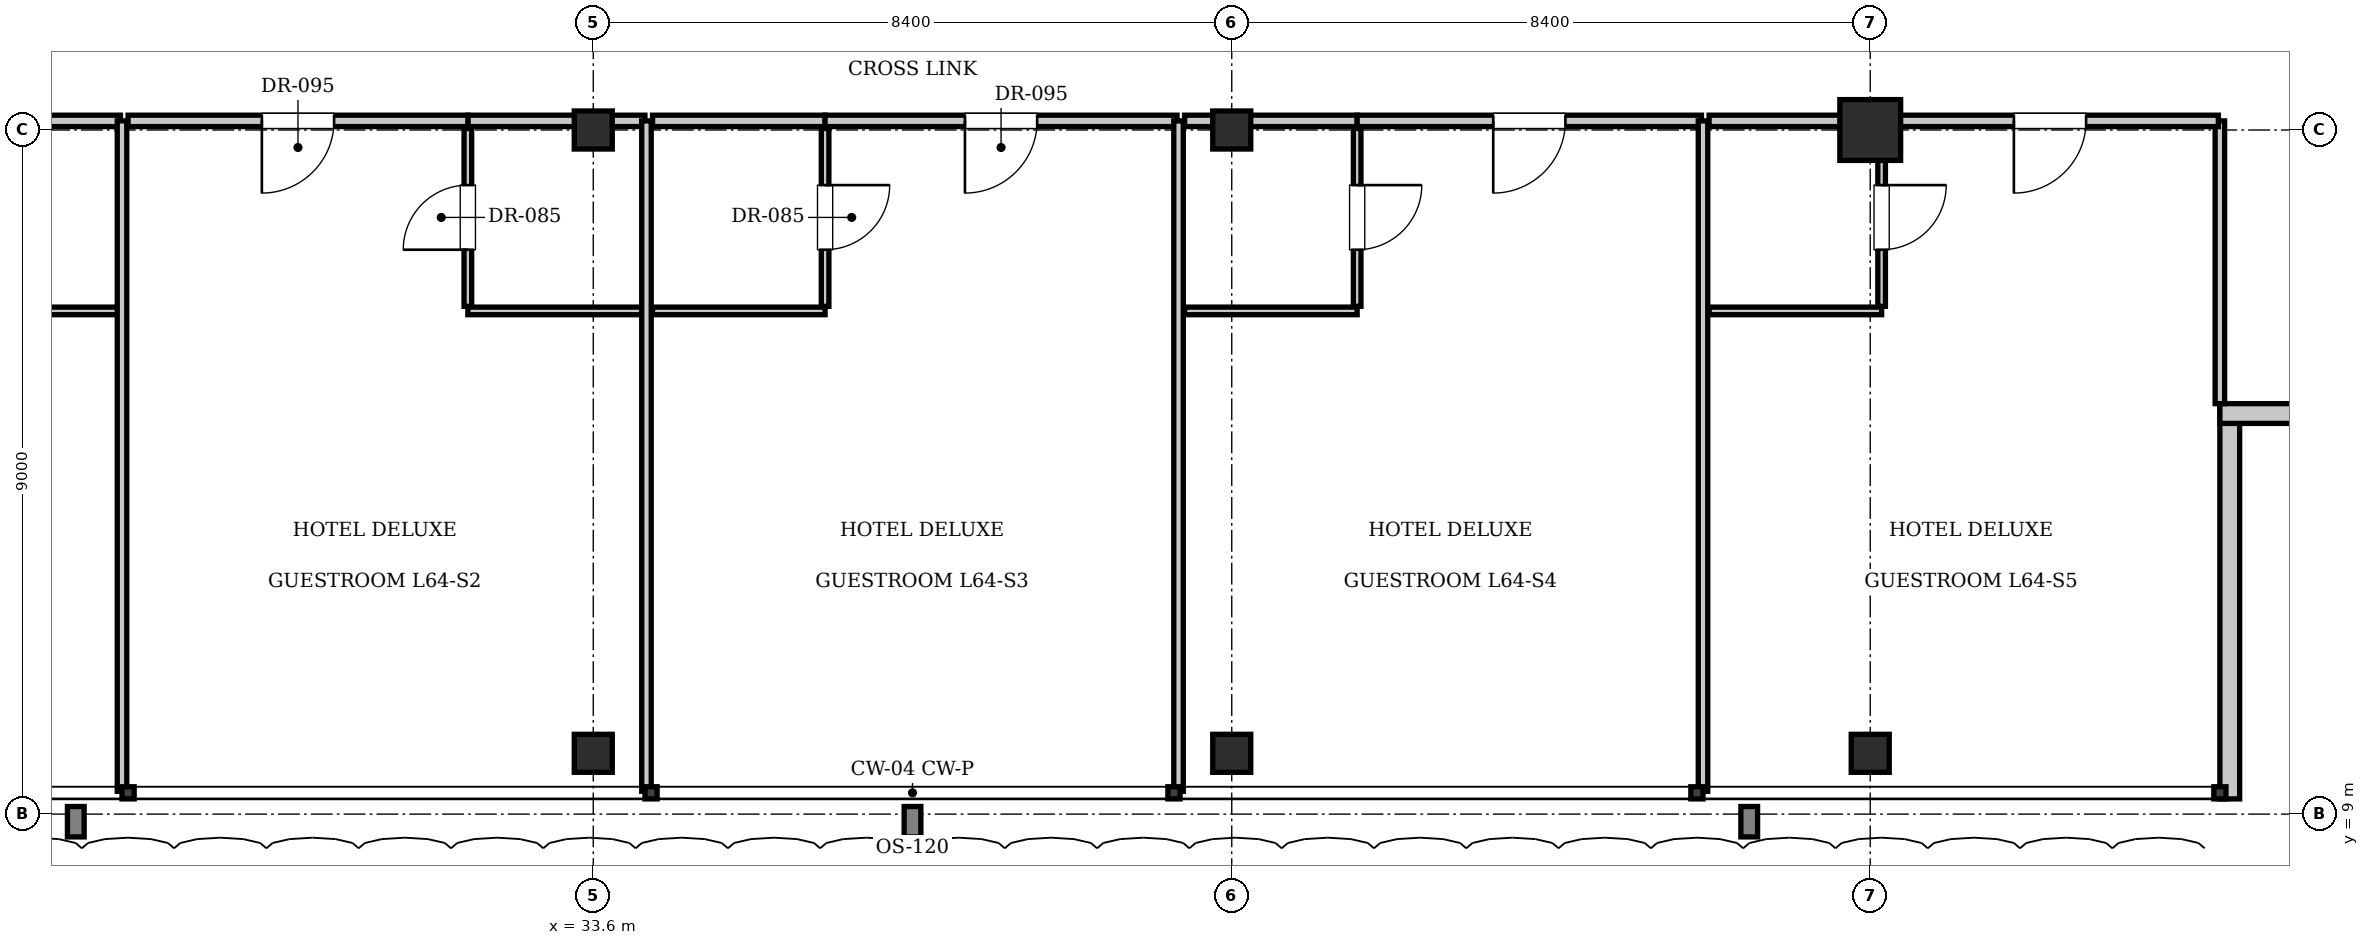
"""IFC4 building model, lengths in metres.
Left out: names, types, materials, properties, quantities, classifications, styles, units other than length and angle.
Written with IfcOpenShell. Run it as: python <this file> out.ifc"""

import sys

from ifc_helpers import new_model, si_unit, direction, frame, frame_2d, origin, origin_2d, place, context, subcontext, project, spatial, rectangle, i_section, extrude, element, fill, save


model = new_model("IFC4")
c1 = context("Model", 3, precision=1e-05, world=origin(), true_north=direction((0.0, 1.0)))
c2 = subcontext(c1, "Body", "Model", "MODEL_VIEW")
j1 = project(units=[si_unit("LENGTHUNIT", "METRE"), si_unit("PLANEANGLEUNIT", "RADIAN")], contexts=[c1])
p1 = place(None, origin())
s1 = spatial("IfcSite", under=j1, at=p1, CompositionType="ELEMENT")
p2 = place(p1, origin())
s2 = spatial("IfcBuilding", under=s1, at=p2, CompositionType="ELEMENT")
p3 = place(p2, frame((0.0, 0.0, 262.5)))
s3 = spatial("IfcBuildingStorey", under=s2, at=p3, CompositionType="ELEMENT", Elevation=262.5)
p4 = place(p3, frame((50.4, 18.0, 0.0), z_axis=(0.0, 0.0, 1.0), x_axis=(1.0, 0.0, 0.0)))
e1 = element("IfcColumn", 1, at=p4, inside=s3, PredefinedType="COLUMN", context=c2, shape_type="SweptSolid", body=[
    extrude(rectangle(XDim=0.8, YDim=0.8, at=origin_2d()), origin(), (0.0, 0.0, 1.0), 3.85),
])
for number, where, z_axis, x_axis in (
    (2, (33.6, 18.0, 0.0), (0.0, 0.0, 1.0), (1.0, 0.0, 0.0)),
    (3, (42.0, 18.0, 0.0), (0.0, 0.0, 1.0), (1.0, 0.0, 0.0)),
    (4, (33.6, 9.8, 0.0), (0.0, 0.0, 1.0), (1.0, 0.0, 0.0)),
    (5, (42.0, 9.8, 0.0), (0.0, 0.0, 1.0), (1.0, 0.0, 0.0)),
    (6, (50.4, 9.8, 0.0), (0.0, 0.0, 1.0), (1.0, 0.0, 0.0)),
):
    element("IfcColumn", number, at=place(p3, frame(where, z_axis=z_axis, x_axis=x_axis)), inside=s3, PredefinedType="COLUMN", context=c2, shape_type="SweptSolid", body=[
        extrude(i_section(OverallWidth=0.5, OverallDepth=0.5, WebThickness=0.022, FlangeThickness=0.032, at=origin_2d()), origin(), (0.0, 0.0, 1.0), 3.85),
    ])
p5 = place(p3, frame((55.13, 14.4, 0.0), z_axis=(0.0, 0.0, 1.0), x_axis=(0.0, -1.0, 0.0)))
e7 = element("IfcWall", 7, at=p5, inside=s3, PredefinedType="SOLIDWALL", context=c2, shape_type="SweptSolid", body=[
    extrude(rectangle(XDim=5.2, YDim=0.26, at=frame_2d((2.6, 0.0))), origin(), (0.0, 0.0, 1.0), 3.61),
])
p6 = place(p3, frame((60.2, 14.27, 0.0), z_axis=(0.0, 0.0, 1.0), x_axis=(-1.0, 0.0, 0.0)))
e8 = element("IfcWall", 8, at=p6, inside=s3, PredefinedType="SOLIDWALL", context=c2, shape_type="SweptSolid", body=[
    extrude(rectangle(XDim=5.2, YDim=0.26, at=frame_2d((2.6, 0.0))), origin(), (0.0, 0.0, 1.0), 3.61),
])
p7 = place(p6, frame((1.6, 0.0, 0.9)))
e9 = element("IfcOpeningElement", 9, at=p7, cuts=e8, PredefinedType="OPENING", context=c2, shape_type="SweptSolid", body=[
    extrude(rectangle(XDim=2.0, YDim=2.2, at=frame_2d((1.0, 1.1))), frame((0.0, 0.14, 0.0), z_axis=(0.0, -1.0, 0.0), x_axis=(1.0, 0.0, 0.0)), (0.0, 0.0, 1.0), 0.28),
])
p8 = place(p3, frame((55.0, 14.4, 0.0), z_axis=(0.0, 0.0, 1.0), x_axis=(0.0, 1.0, 0.0)))
e10 = element("IfcWall", 10, at=p8, inside=s3, PredefinedType="PARTITIONING", context=c2, shape_type="SweptSolid", body=[
    extrude(rectangle(XDim=3.72, YDim=0.125, at=frame_2d((1.86, 0.0))), origin(), (0.0, 0.0, 1.0), 3.61),
])
p9 = place(p3, frame((25.05, 18.12, 0.0), z_axis=(0.0, 0.0, 1.0), x_axis=(1.0, 0.0, 0.0)))
e11 = element("IfcWall", 11, at=p9, inside=s3, PredefinedType="PARTITIONING", context=c2, shape_type="SweptSolid", body=[
    extrude(rectangle(XDim=2.33, YDim=0.15, at=frame_2d((1.165, 0.0))), origin(), (0.0, 0.0, 1.0), 3.077),
])
p10 = place(p3, frame((25.05, 15.62, 0.0), z_axis=(0.0, 0.0, 1.0), x_axis=(1.0, 0.0, 0.0)))
e12 = element("IfcWall", 12, at=p10, inside=s3, PredefinedType="PARTITIONING", context=c2, shape_type="SweptSolid", body=[
    extrude(rectangle(XDim=2.31, YDim=0.1, at=frame_2d((1.155, 0.0))), origin(), (0.0, 0.0, 1.0), 3.61),
])
p11 = place(p3, frame((27.4, 9.3, 0.0), z_axis=(0.0, 0.0, 1.0), x_axis=(0.0, 1.0, 0.0)))
e13 = element("IfcWall", 13, at=p11, inside=s3, PredefinedType="PARTITIONING", context=c2, shape_type="SweptSolid", body=[
    extrude(rectangle(XDim=8.82, YDim=0.125, at=frame_2d((4.41, 0.0))), origin(), (0.0, 0.0, 1.0), 3.61),
])
p12 = place(p3, frame((31.95, 18.12, 0.0), z_axis=(0.0, 0.0, 1.0), x_axis=(1.0, 0.0, 0.0)))
e14 = element("IfcWall", 14, at=p12, inside=s3, PredefinedType="PARTITIONING", context=c2, shape_type="SweptSolid", body=[
    extrude(rectangle(XDim=2.33, YDim=0.15, at=frame_2d((1.165, 0.0))), origin(), (0.0, 0.0, 1.0), 3.077),
])
p13 = place(p3, frame((31.95, 15.62, 0.0), z_axis=(0.0, 0.0, 1.0), x_axis=(1.0, 0.0, 0.0)))
e15 = element("IfcWall", 15, at=p13, inside=s3, PredefinedType="PARTITIONING", context=c2, shape_type="SweptSolid", body=[
    extrude(rectangle(XDim=2.31, YDim=0.1, at=frame_2d((1.155, 0.0))), origin(), (0.0, 0.0, 1.0), 3.61),
])
p14 = place(p3, frame((31.95, 15.68, 0.0), z_axis=(0.0, 0.0, 1.0), x_axis=(0.0, 1.0, 0.0)))
e16 = element("IfcWall", 16, at=p14, inside=s3, PredefinedType="PARTITIONING", context=c2, shape_type="SweptSolid", body=[
    extrude(rectangle(XDim=2.34, YDim=0.1, at=frame_2d((1.17, 0.0))), origin(), (0.0, 0.0, 1.0), 3.61),
])
p15 = place(p14, frame((0.745, 0.0, 0.0)))
e17 = element("IfcOpeningElement", 17, at=p15, cuts=e16, PredefinedType="OPENING", context=c2, shape_type="SweptSolid", body=[
    extrude(rectangle(XDim=0.85, YDim=2.1, at=frame_2d((0.425, 1.05))), frame((0.0, 0.06, 0.0), z_axis=(0.0, -1.0, 0.0), x_axis=(1.0, 0.0, 0.0)), (0.0, 0.0, 1.0), 0.12),
])
p16 = place(p3, frame((27.48, 18.12, 0.0), z_axis=(0.0, 0.0, 1.0), x_axis=(1.0, 0.0, 0.0)))
e18 = element("IfcWall", 18, at=p16, inside=s3, PredefinedType="PARTITIONING", context=c2, shape_type="SweptSolid", body=[
    extrude(rectangle(XDim=4.47, YDim=0.15, at=frame_2d((2.235, 0.0))), origin(), (0.0, 0.0, 1.0), 3.077),
])
p17 = place(p16, frame((1.76, 0.0, 0.0)))
e19 = element("IfcOpeningElement", 19, at=p17, cuts=e18, PredefinedType="OPENING", context=c2, shape_type="SweptSolid", body=[
    extrude(rectangle(XDim=0.95, YDim=2.15, at=frame_2d((0.475, 1.075))), frame((0.0, 0.085, 0.0), z_axis=(0.0, -1.0, 0.0), x_axis=(1.0, 0.0, 0.0)), (0.0, 0.0, 1.0), 0.17),
])
p18 = place(p3, frame((34.3, 9.3, 0.0), z_axis=(0.0, 0.0, 1.0), x_axis=(0.0, 1.0, 0.0)))
e20 = element("IfcWall", 20, at=p18, inside=s3, PredefinedType="PARTITIONING", context=c2, shape_type="SweptSolid", body=[
    extrude(rectangle(XDim=8.82, YDim=0.125, at=frame_2d((4.41, 0.0))), origin(), (0.0, 0.0, 1.0), 3.61),
])
p19 = place(p3, frame((34.38, 18.12, 0.0), z_axis=(0.0, 0.0, 1.0), x_axis=(1.0, 0.0, 0.0)))
e21 = element("IfcWall", 21, at=p19, inside=s3, PredefinedType="PARTITIONING", context=c2, shape_type="SweptSolid", body=[
    extrude(rectangle(XDim=2.27, YDim=0.15, at=frame_2d((1.135, 0.0))), origin(), (0.0, 0.0, 1.0), 3.077),
])
p20 = place(p3, frame((34.38, 15.62, 0.0), z_axis=(0.0, 0.0, 1.0), x_axis=(1.0, 0.0, 0.0)))
e22 = element("IfcWall", 22, at=p20, inside=s3, PredefinedType="PARTITIONING", context=c2, shape_type="SweptSolid", body=[
    extrude(rectangle(XDim=2.27, YDim=0.1, at=frame_2d((1.135, 0.0))), origin(), (0.0, 0.0, 1.0), 3.61),
])
p21 = place(p3, frame((36.65, 15.68, 0.0), z_axis=(0.0, 0.0, 1.0), x_axis=(0.0, 1.0, 0.0)))
e23 = element("IfcWall", 23, at=p21, inside=s3, PredefinedType="PARTITIONING", context=c2, shape_type="SweptSolid", body=[
    extrude(rectangle(XDim=2.34, YDim=0.1, at=frame_2d((1.17, 0.0))), origin(), (0.0, 0.0, 1.0), 3.61),
])
p22 = place(p21, frame((0.745, 0.0, 0.0)))
e24 = element("IfcOpeningElement", 24, at=p22, cuts=e23, PredefinedType="OPENING", context=c2, shape_type="SweptSolid", body=[
    extrude(rectangle(XDim=0.85, YDim=2.1, at=frame_2d((0.425, 1.05))), frame((0.0, 0.06, 0.0), z_axis=(0.0, -1.0, 0.0), x_axis=(1.0, 0.0, 0.0)), (0.0, 0.0, 1.0), 0.12),
])
p23 = place(p3, frame((36.65, 18.12, 0.0), z_axis=(0.0, 0.0, 1.0), x_axis=(1.0, 0.0, 0.0)))
e25 = element("IfcWall", 25, at=p23, inside=s3, PredefinedType="PARTITIONING", context=c2, shape_type="SweptSolid", body=[
    extrude(rectangle(XDim=4.63, YDim=0.15, at=frame_2d((2.315, 0.0))), origin(), (0.0, 0.0, 1.0), 3.077),
])
p24 = place(p23, frame((1.84, 0.0, 0.0)))
e26 = element("IfcOpeningElement", 26, at=p24, cuts=e25, PredefinedType="OPENING", context=c2, shape_type="SweptSolid", body=[
    extrude(rectangle(XDim=0.95, YDim=2.15, at=frame_2d((0.475, 1.075))), frame((0.0, 0.085, 0.0), z_axis=(0.0, -1.0, 0.0), x_axis=(1.0, 0.0, 0.0)), (0.0, 0.0, 1.0), 0.17),
])
p25 = place(p3, frame((41.3, 9.3, 0.0), z_axis=(0.0, 0.0, 1.0), x_axis=(0.0, 1.0, 0.0)))
e27 = element("IfcWall", 27, at=p25, inside=s3, PredefinedType="PARTITIONING", context=c2, shape_type="SweptSolid", body=[
    extrude(rectangle(XDim=8.82, YDim=0.125, at=frame_2d((4.41, 0.0))), origin(), (0.0, 0.0, 1.0), 3.61),
])
p26 = place(p3, frame((41.38, 18.12, 0.0), z_axis=(0.0, 0.0, 1.0), x_axis=(1.0, 0.0, 0.0)))
e28 = element("IfcWall", 28, at=p26, inside=s3, PredefinedType="PARTITIONING", context=c2, shape_type="SweptSolid", body=[
    extrude(rectangle(XDim=2.27, YDim=0.15, at=frame_2d((1.135, 0.0))), origin(), (0.0, 0.0, 1.0), 3.077),
])
p27 = place(p3, frame((41.38, 15.62, 0.0), z_axis=(0.0, 0.0, 1.0), x_axis=(1.0, 0.0, 0.0)))
e29 = element("IfcWall", 29, at=p27, inside=s3, PredefinedType="PARTITIONING", context=c2, shape_type="SweptSolid", body=[
    extrude(rectangle(XDim=2.27, YDim=0.1, at=frame_2d((1.135, 0.0))), origin(), (0.0, 0.0, 1.0), 3.61),
])
p28 = place(p3, frame((43.65, 15.68, 0.0), z_axis=(0.0, 0.0, 1.0), x_axis=(0.0, 1.0, 0.0)))
e30 = element("IfcWall", 30, at=p28, inside=s3, PredefinedType="PARTITIONING", context=c2, shape_type="SweptSolid", body=[
    extrude(rectangle(XDim=2.34, YDim=0.1, at=frame_2d((1.17, 0.0))), origin(), (0.0, 0.0, 1.0), 3.61),
])
p29 = place(p28, frame((0.745, 0.0, 0.0)))
e31 = element("IfcOpeningElement", 31, at=p29, cuts=e30, PredefinedType="OPENING", context=c2, shape_type="SweptSolid", body=[
    extrude(rectangle(XDim=0.85, YDim=2.1, at=frame_2d((0.425, 1.05))), frame((0.0, 0.06, 0.0), z_axis=(0.0, -1.0, 0.0), x_axis=(1.0, 0.0, 0.0)), (0.0, 0.0, 1.0), 0.12),
])
p30 = place(p3, frame((43.65, 18.12, 0.0), z_axis=(0.0, 0.0, 1.0), x_axis=(1.0, 0.0, 0.0)))
e32 = element("IfcWall", 32, at=p30, inside=s3, PredefinedType="PARTITIONING", context=c2, shape_type="SweptSolid", body=[
    extrude(rectangle(XDim=4.53, YDim=0.15, at=frame_2d((2.265, 0.0))), origin(), (0.0, 0.0, 1.0), 3.077),
])
p31 = place(p30, frame((1.79, 0.0, 0.0)))
e33 = element("IfcOpeningElement", 33, at=p31, cuts=e32, PredefinedType="OPENING", context=c2, shape_type="SweptSolid", body=[
    extrude(rectangle(XDim=0.95, YDim=2.15, at=frame_2d((0.475, 1.075))), frame((0.0, 0.085, 0.0), z_axis=(0.0, -1.0, 0.0), x_axis=(1.0, 0.0, 0.0)), (0.0, 0.0, 1.0), 0.17),
])
p32 = place(p3, frame((48.2, 9.3, 0.0), z_axis=(0.0, 0.0, 1.0), x_axis=(0.0, 1.0, 0.0)))
e34 = element("IfcWall", 34, at=p32, inside=s3, PredefinedType="PARTITIONING", context=c2, shape_type="SweptSolid", body=[
    extrude(rectangle(XDim=8.82, YDim=0.125, at=frame_2d((4.41, 0.0))), origin(), (0.0, 0.0, 1.0), 3.61),
])
p33 = place(p3, frame((48.28, 18.12, 0.0), z_axis=(0.0, 0.0, 1.0), x_axis=(1.0, 0.0, 0.0)))
e35 = element("IfcWall", 35, at=p33, inside=s3, PredefinedType="PARTITIONING", context=c2, shape_type="SweptSolid", body=[
    extrude(rectangle(XDim=2.27, YDim=0.15, at=frame_2d((1.135, 0.0))), origin(), (0.0, 0.0, 1.0), 3.077),
])
p34 = place(p3, frame((48.28, 15.62, 0.0), z_axis=(0.0, 0.0, 1.0), x_axis=(1.0, 0.0, 0.0)))
e36 = element("IfcWall", 36, at=p34, inside=s3, PredefinedType="PARTITIONING", context=c2, shape_type="SweptSolid", body=[
    extrude(rectangle(XDim=2.27, YDim=0.1, at=frame_2d((1.135, 0.0))), origin(), (0.0, 0.0, 1.0), 3.61),
])
p35 = place(p3, frame((50.55, 15.68, 0.0), z_axis=(0.0, 0.0, 1.0), x_axis=(0.0, 1.0, 0.0)))
e37 = element("IfcWall", 37, at=p35, inside=s3, PredefinedType="PARTITIONING", context=c2, shape_type="SweptSolid", body=[
    extrude(rectangle(XDim=2.34, YDim=0.1, at=frame_2d((1.17, 0.0))), origin(), (0.0, 0.0, 1.0), 3.61),
])
p36 = place(p35, frame((0.745, 0.0, 0.0)))
e38 = element("IfcOpeningElement", 38, at=p36, cuts=e37, PredefinedType="OPENING", context=c2, shape_type="SweptSolid", body=[
    extrude(rectangle(XDim=0.85, YDim=2.1, at=frame_2d((0.425, 1.05))), frame((0.0, 0.06, 0.0), z_axis=(0.0, -1.0, 0.0), x_axis=(1.0, 0.0, 0.0)), (0.0, 0.0, 1.0), 0.12),
])
p37 = place(p3, frame((50.55, 18.12, 0.0), z_axis=(0.0, 0.0, 1.0), x_axis=(1.0, 0.0, 0.0)))
e39 = element("IfcWall", 39, at=p37, inside=s3, PredefinedType="PARTITIONING", context=c2, shape_type="SweptSolid", body=[
    extrude(rectangle(XDim=4.43, YDim=0.15, at=frame_2d((2.215, 0.0))), origin(), (0.0, 0.0, 1.0), 3.077),
])
p38 = place(p37, frame((1.74, 0.0, 0.0)))
e40 = element("IfcOpeningElement", 40, at=p38, cuts=e39, PredefinedType="OPENING", context=c2, shape_type="SweptSolid", body=[
    extrude(rectangle(XDim=0.95, YDim=2.15, at=frame_2d((0.475, 1.075))), frame((0.0, 0.085, 0.0), z_axis=(0.0, -1.0, 0.0), x_axis=(1.0, 0.0, 0.0)), (0.0, 0.0, 1.0), 0.17),
])
p39 = place(p15, origin())
e41 = element("IfcDoor", 41, at=p39, inside=s3, OperationType="SINGLE_SWING_LEFT", PredefinedType="DOOR", context=c2, shape_type="SweptSolid", body=[
    extrude(rectangle(XDim=0.85, YDim=2.1, at=frame_2d((0.425, 1.05))), frame((0.0, 0.025, 0.0), z_axis=(0.0, -1.0, 0.0), x_axis=(1.0, 0.0, 0.0)), (0.0, 0.0, 1.0), 0.05),
])
fill(e17, e41)
p40 = place(p17, frame((0.95, 0.0, 0.0), z_axis=(0.0, 0.0, 1.0), x_axis=(-1.0, 0.0, 0.0)))
e42 = element("IfcDoor", 42, at=p40, inside=s3, OperationType="SINGLE_SWING_RIGHT", PredefinedType="DOOR", context=c2, shape_type="SweptSolid", body=[
    extrude(rectangle(XDim=0.95, YDim=2.15, at=frame_2d((0.475, 1.075))), frame((0.0, 0.025, 0.0), z_axis=(0.0, -1.0, 0.0), x_axis=(1.0, 0.0, 0.0)), (0.0, 0.0, 1.0), 0.05),
])
fill(e19, e42)
p41 = place(p22, frame((0.85, 0.0, 0.0), z_axis=(0.0, 0.0, 1.0), x_axis=(-1.0, 0.0, 0.0)))
e43 = element("IfcDoor", 43, at=p41, inside=s3, OperationType="SINGLE_SWING_LEFT", PredefinedType="DOOR", context=c2, shape_type="SweptSolid", body=[
    extrude(rectangle(XDim=0.85, YDim=2.1, at=frame_2d((0.425, 1.05))), frame((0.0, 0.025, 0.0), z_axis=(0.0, -1.0, 0.0), x_axis=(1.0, 0.0, 0.0)), (0.0, 0.0, 1.0), 0.05),
])
fill(e24, e43)
p42 = place(p24, frame((0.95, 0.0, 0.0), z_axis=(0.0, 0.0, 1.0), x_axis=(-1.0, 0.0, 0.0)))
e44 = element("IfcDoor", 44, at=p42, inside=s3, OperationType="SINGLE_SWING_RIGHT", PredefinedType="DOOR", context=c2, shape_type="SweptSolid", body=[
    extrude(rectangle(XDim=0.95, YDim=2.15, at=frame_2d((0.475, 1.075))), frame((0.0, 0.025, 0.0), z_axis=(0.0, -1.0, 0.0), x_axis=(1.0, 0.0, 0.0)), (0.0, 0.0, 1.0), 0.05),
])
fill(e26, e44)
p43 = place(p29, frame((0.85, 0.0, 0.0), z_axis=(0.0, 0.0, 1.0), x_axis=(-1.0, 0.0, 0.0)))
e45 = element("IfcDoor", 45, at=p43, inside=s3, OperationType="SINGLE_SWING_LEFT", PredefinedType="DOOR", context=c2, shape_type="SweptSolid", body=[
    extrude(rectangle(XDim=0.85, YDim=2.1, at=frame_2d((0.425, 1.05))), frame((0.0, 0.025, 0.0), z_axis=(0.0, -1.0, 0.0), x_axis=(1.0, 0.0, 0.0)), (0.0, 0.0, 1.0), 0.05),
])
fill(e31, e45)
p44 = place(p31, frame((0.95, 0.0, 0.0), z_axis=(0.0, 0.0, 1.0), x_axis=(-1.0, 0.0, 0.0)))
e46 = element("IfcDoor", 46, at=p44, inside=s3, OperationType="SINGLE_SWING_RIGHT", PredefinedType="DOOR", context=c2, shape_type="SweptSolid", body=[
    extrude(rectangle(XDim=0.95, YDim=2.15, at=frame_2d((0.475, 1.075))), frame((0.0, 0.025, 0.0), z_axis=(0.0, -1.0, 0.0), x_axis=(1.0, 0.0, 0.0)), (0.0, 0.0, 1.0), 0.05),
])
fill(e33, e46)
p45 = place(p36, frame((0.85, 0.0, 0.0), z_axis=(0.0, 0.0, 1.0), x_axis=(-1.0, 0.0, 0.0)))
e47 = element("IfcDoor", 47, at=p45, inside=s3, OperationType="SINGLE_SWING_LEFT", PredefinedType="DOOR", context=c2, shape_type="SweptSolid", body=[
    extrude(rectangle(XDim=0.85, YDim=2.1, at=frame_2d((0.425, 1.05))), frame((0.0, 0.025, 0.0), z_axis=(0.0, -1.0, 0.0), x_axis=(1.0, 0.0, 0.0)), (0.0, 0.0, 1.0), 0.05),
])
fill(e38, e47)
p46 = place(p38, frame((0.95, 0.0, 0.0), z_axis=(0.0, 0.0, 1.0), x_axis=(-1.0, 0.0, 0.0)))
e48 = element("IfcDoor", 48, at=p46, inside=s3, OperationType="SINGLE_SWING_RIGHT", PredefinedType="DOOR", context=c2, shape_type="SweptSolid", body=[
    extrude(rectangle(XDim=0.95, YDim=2.15, at=frame_2d((0.475, 1.075))), frame((0.0, 0.025, 0.0), z_axis=(0.0, -1.0, 0.0), x_axis=(1.0, 0.0, 0.0)), (0.0, 0.0, 1.0), 0.05),
])
fill(e40, e48)
save(model, sys.argv[1])
